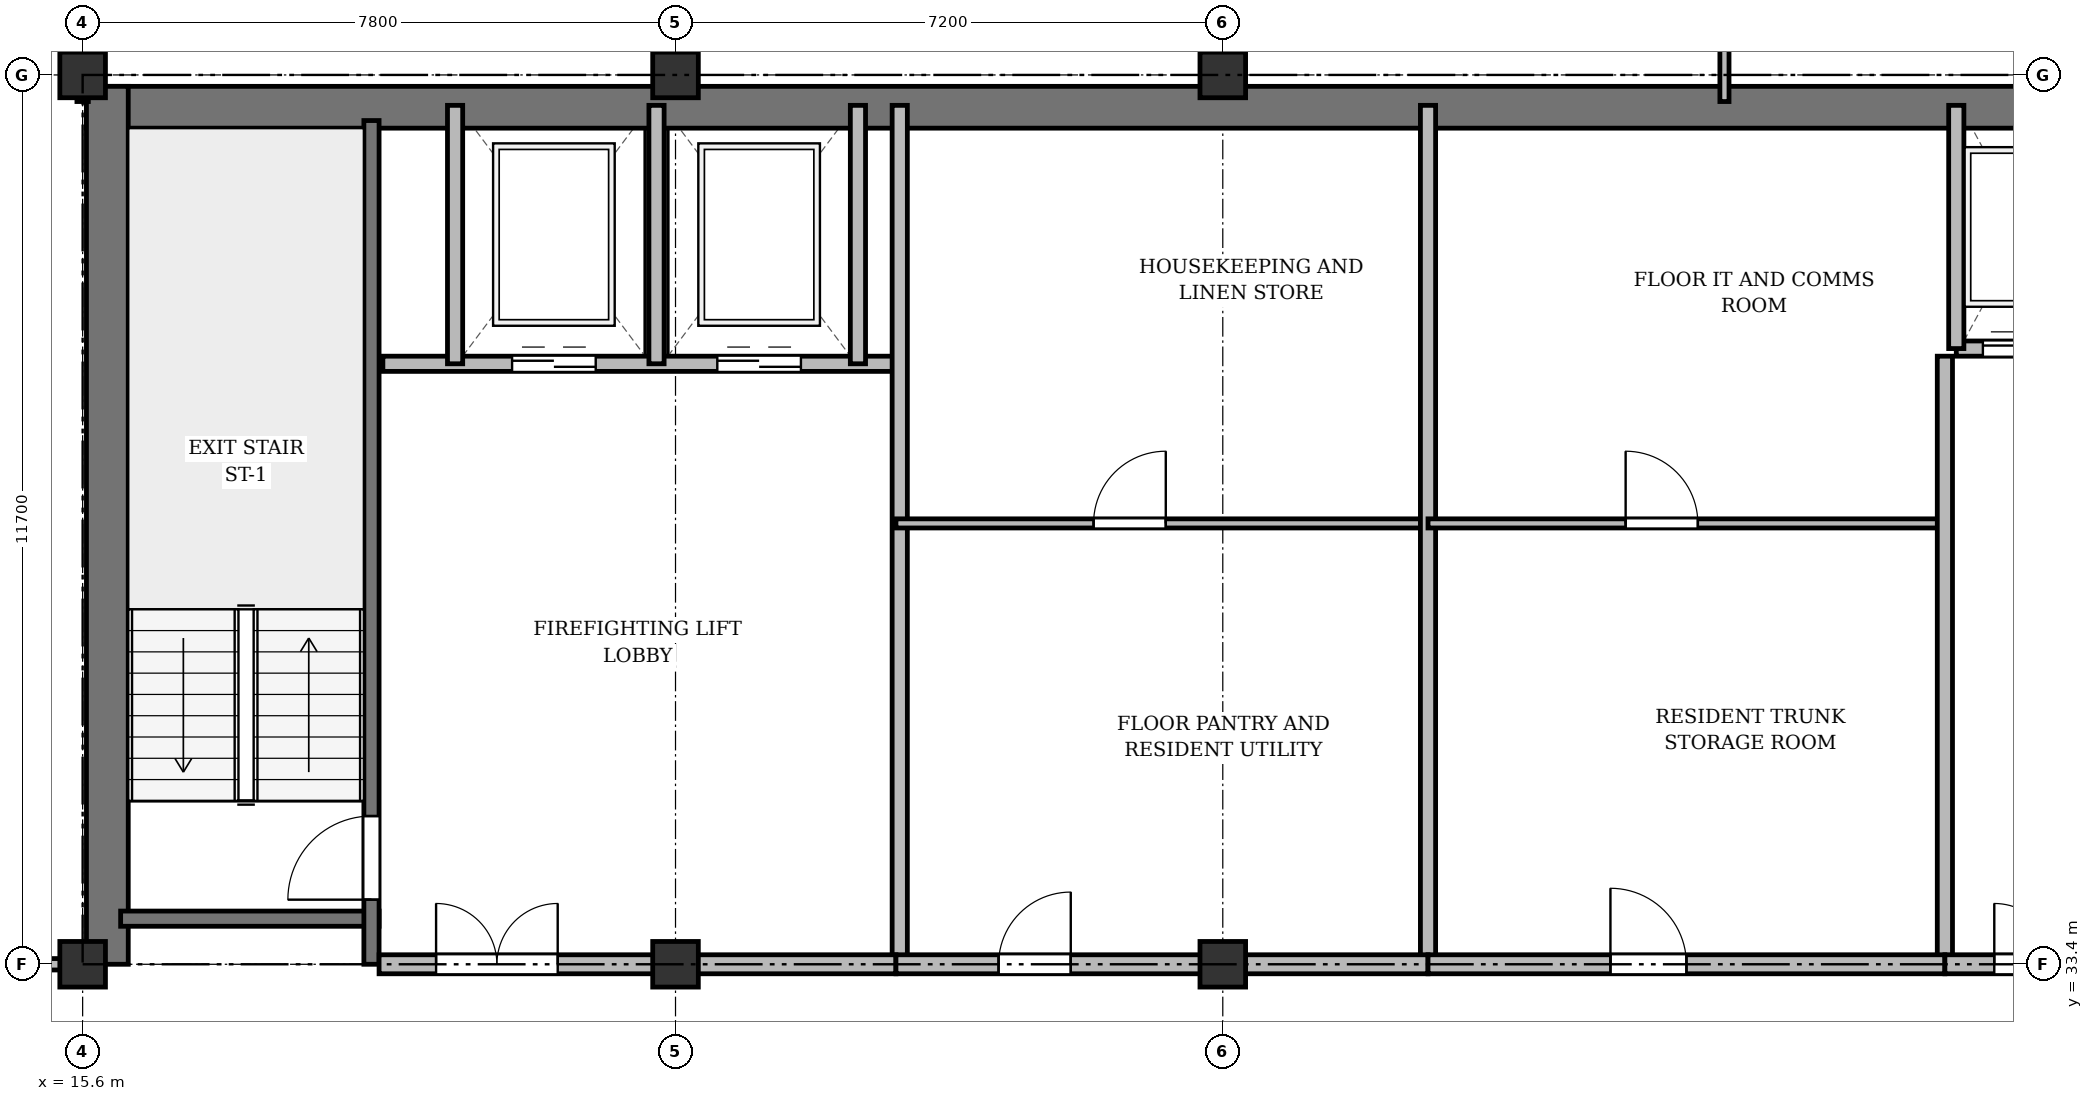
"""IFC4 building model, lengths in metres.
Left out: names, types, materials, properties, quantities, classifications, styles, units other than length and angle.
Written with IfcOpenShell. Run it as: python <this file> out.ifc"""

import sys

from ifc_helpers import new_model, si_unit, direction, frame, frame_2d, origin, origin_2d, place, context, subcontext, project, spatial, rectangle, extrude, source, transform, mapped, element, fill, save


model = new_model("IFC4")
c1 = context("Model", 3, precision=1e-05, world=origin(), true_north=direction((0.0, 1.0)))
c2 = subcontext(c1, "Body", "Model", "MODEL_VIEW")
j1 = project(units=[si_unit("LENGTHUNIT", "METRE"), si_unit("PLANEANGLEUNIT", "RADIAN")], contexts=[c1])
p1 = place(None, origin())
s1 = spatial("IfcSite", under=j1, at=p1, CompositionType="ELEMENT")
p2 = place(p1, origin())
s2 = spatial("IfcBuilding", under=s1, at=p2, CompositionType="ELEMENT")
p3 = place(p2, frame((0.0, 0.0, 270.3)))
s3 = spatial("IfcBuildingStorey", under=s2, at=p3, CompositionType="ELEMENT", Elevation=270.3)
m1 = source(origin(), c2, "Body", "SweptSolid", [
    extrude(rectangle(XDim=0.6, YDim=0.6, at=origin_2d()), origin(), (0.0, 0.0, 1.0), 3.6),
])
for number, where, z_axis, x_axis in (
    (1, (15.6, 33.4, 0.0), (0.0, 0.0, 1.0), (1.0, 0.0, 0.0)),
    (2, (15.6, 45.1, 0.0), (0.0, 0.0, 1.0), (1.0, 0.0, 0.0)),
    (3, (23.4, 33.4, 0.0), (0.0, 0.0, 1.0), (1.0, 0.0, 0.0)),
    (4, (23.4, 45.1, 0.0), (0.0, 0.0, 1.0), (1.0, 0.0, 0.0)),
    (5, (30.6, 33.4, 0.0), (0.0, 0.0, 1.0), (1.0, 0.0, 0.0)),
    (6, (30.6, 45.1, 0.0), (0.0, 0.0, 1.0), (1.0, 0.0, 0.0)),
):
    element("IfcColumn", number, at=place(p3, frame(where, z_axis=z_axis, x_axis=x_axis)), inside=s3, PredefinedType="COLUMN", context=c2, shape_type="MappedRepresentation", body=[
        mapped(m1, transform((0.0, 0.0, 0.0), x_axis=(1.0, 0.0, 0.0), y_axis=(0.0, 1.0, 0.0), z_axis=(0.0, 0.0, 1.0), scale=1.0)),
    ])
p4 = place(p3, frame((15.65, 44.675, 0.0), z_axis=(0.0, 0.0, 1.0), x_axis=(1.0, 0.0, 0.0)))
e7 = element("IfcWall", 7, at=p4, inside=s3, PredefinedType="SHEAR", context=c2, shape_type="SweptSolid", body=[
    extrude(rectangle(XDim=43.1, YDim=0.55, at=frame_2d((21.55, 0.0))), origin(), (0.0, 0.0, 1.0), 3.37),
])
p5 = place(p3, frame((15.925, 33.4, 0.0), z_axis=(0.0, 0.0, 1.0), x_axis=(0.0, 1.0, 0.0)))
e8 = element("IfcWall", 8, at=p5, inside=s3, PredefinedType="SHEAR", context=c2, shape_type="SweptSolid", body=[
    extrude(rectangle(XDim=11.55, YDim=0.55, at=frame_2d((5.775, 0.0))), origin(), (0.0, 0.0, 1.0), 3.37),
])
p6 = place(p3, frame((16.1, 34.0, 0.0), z_axis=(0.0, 0.0, 1.0), x_axis=(1.0, 0.0, 0.0)))
e9 = element("IfcWall", 9, at=p6, inside=s3, PredefinedType="SHEAR", context=c2, shape_type="SweptSolid", body=[
    extrude(rectangle(XDim=3.4, YDim=0.2, at=frame_2d((1.7, 0.0))), origin(), (0.0, 0.0, 1.0), 3.37),
])
p7 = place(p3, frame((19.4, 33.4, 0.0), z_axis=(0.0, 0.0, 1.0), x_axis=(0.0, 1.0, 0.0)))
e10 = element("IfcWall", 10, at=p7, inside=s3, PredefinedType="SHEAR", context=c2, shape_type="SweptSolid", body=[
    extrude(rectangle(XDim=11.1, YDim=0.2, at=frame_2d((5.55, 0.0))), origin(), (0.0, 0.0, 1.0), 3.37),
])
p8 = place(p7, frame((0.85, 0.0, 0.0)))
e11 = element("IfcOpeningElement", 11, at=p8, cuts=e10, PredefinedType="OPENING", context=c2, shape_type="SweptSolid", body=[
    extrude(rectangle(XDim=1.1, YDim=2.15, at=frame_2d((0.55, 1.075))), frame((0.0, 0.11, 0.0), z_axis=(0.0, -1.0, 0.0), x_axis=(1.0, 0.0, 0.0)), (0.0, 0.0, 1.0), 0.22),
])
p9 = place(p3, frame((19.55, 41.3, 0.0), z_axis=(0.0, 0.0, 1.0), x_axis=(1.0, 0.0, 0.0)))
e12 = element("IfcWall", 12, at=p9, inside=s3, PredefinedType="SOLIDWALL", context=c2, shape_type="SweptSolid", body=[
    extrude(rectangle(XDim=6.75, YDim=0.2, at=frame_2d((3.375, 0.0))), origin(), (0.0, 0.0, 1.0), 3.37),
])
p10 = place(p9, frame((1.7, 0.0, 0.0)))
e13 = element("IfcOpeningElement", 13, at=p10, cuts=e12, PredefinedType="OPENING", context=c2, shape_type="SweptSolid", body=[
    extrude(rectangle(XDim=1.1, YDim=2.15, at=frame_2d((0.55, 1.075))), frame((0.0, 0.11, 0.0), z_axis=(0.0, -1.0, 0.0), x_axis=(1.0, 0.0, 0.0)), (0.0, 0.0, 1.0), 0.22),
])
p11 = place(p9, frame((4.4, 0.0, 0.0)))
e14 = element("IfcOpeningElement", 14, at=p11, cuts=e12, PredefinedType="OPENING", context=c2, shape_type="SweptSolid", body=[
    extrude(rectangle(XDim=1.1, YDim=2.15, at=frame_2d((0.55, 1.075))), frame((0.0, 0.11, 0.0), z_axis=(0.0, -1.0, 0.0), x_axis=(1.0, 0.0, 0.0)), (0.0, 0.0, 1.0), 0.22),
])
for number, where, z_axis, x_axis in (
    (15, (20.5, 41.3, 0.0), (0.0, 0.0, 1.0), (0.0, 1.0, 0.0)),
    (16, (23.15, 41.3, 0.0), (0.0, 0.0, 1.0), (0.0, 1.0, 0.0)),
    (17, (25.8, 41.3, 0.0), (0.0, 0.0, 1.0), (0.0, 1.0, 0.0)),
):
    element("IfcWall", number, at=place(p3, frame(where, z_axis=z_axis, x_axis=x_axis)), inside=s3, PredefinedType="SOLIDWALL", context=c2, shape_type="SweptSolid", body=[
        extrude(rectangle(XDim=3.4, YDim=0.2, at=frame_2d((1.7, 0.0))), origin(), (0.0, 0.0, 1.0), 3.37),
    ])
p12 = place(p3, frame((26.35, 33.4, 0.0), z_axis=(0.0, 0.0, 1.0), x_axis=(0.0, 1.0, 0.0)))
e18 = element("IfcWall", 18, at=p12, inside=s3, PredefinedType="SOLIDWALL", context=c2, shape_type="SweptSolid", body=[
    extrude(rectangle(XDim=11.3, YDim=0.2, at=frame_2d((5.65, 0.0))), origin(), (0.0, 0.0, 1.0), 2.92),
])
p13 = place(p3, frame((19.5, 33.4, 0.0), z_axis=(0.0, 0.0, 1.0), x_axis=(1.0, 0.0, 0.0)))
e19 = element("IfcWall", 19, at=p13, inside=s3, PredefinedType="PARTITIONING", context=c2, shape_type="SweptSolid", body=[
    extrude(rectangle(XDim=6.8, YDim=0.25, at=frame_2d((3.4, 0.0))), origin(), (0.0, 0.0, 1.0), 2.92),
])
p14 = place(p13, frame((0.75, 0.0, 0.0)))
e20 = element("IfcOpeningElement", 20, at=p14, cuts=e19, PredefinedType="OPENING", context=c2, shape_type="SweptSolid", body=[
    extrude(rectangle(XDim=1.6, YDim=2.2, at=frame_2d((0.8, 1.1))), frame((0.0, 0.135, 0.0), z_axis=(0.0, -1.0, 0.0), x_axis=(1.0, 0.0, 0.0)), (0.0, 0.0, 1.0), 0.27),
])
p15 = place(p3, frame((26.3, 39.2, 0.0), z_axis=(0.0, 0.0, 1.0), x_axis=(1.0, 0.0, 0.0)))
e21 = element("IfcWall", 21, at=p15, inside=s3, PredefinedType="PARTITIONING", context=c2, shape_type="SweptSolid", body=[
    extrude(rectangle(XDim=7.0, YDim=0.12, at=frame_2d((3.5, 0.0))), origin(), (0.0, 0.0, 1.0), 2.87),
])
p16 = place(p15, frame((2.6, 0.0, 0.0)))
e22 = element("IfcOpeningElement", 22, at=p16, cuts=e21, PredefinedType="OPENING", context=c2, shape_type="SweptSolid", body=[
    extrude(rectangle(XDim=0.95, YDim=2.15, at=frame_2d((0.475, 1.075))), frame((0.0, 0.07, 0.0), z_axis=(0.0, -1.0, 0.0), x_axis=(1.0, 0.0, 0.0)), (0.0, 0.0, 1.0), 0.14),
])
p17 = place(p3, frame((33.3, 33.4, 0.0), z_axis=(0.0, 0.0, 1.0), x_axis=(0.0, 1.0, 0.0)))
e23 = element("IfcWall", 23, at=p17, inside=s3, PredefinedType="SOLIDWALL", context=c2, shape_type="SweptSolid", body=[
    extrude(rectangle(XDim=11.3, YDim=0.2, at=frame_2d((5.65, 0.0))), origin(), (0.0, 0.0, 1.0), 2.92),
])
p18 = place(p3, frame((33.3, 39.2, 0.0), z_axis=(0.0, 0.0, 1.0), x_axis=(1.0, 0.0, 0.0)))
e24 = element("IfcWall", 24, at=p18, inside=s3, PredefinedType="PARTITIONING", context=c2, shape_type="SweptSolid", body=[
    extrude(rectangle(XDim=6.8, YDim=0.12, at=frame_2d((3.4, 0.0))), origin(), (0.0, 0.0, 1.0), 3.37),
])
p19 = place(p18, frame((2.6, 0.0, 0.0)))
e25 = element("IfcOpeningElement", 25, at=p19, cuts=e24, PredefinedType="OPENING", context=c2, shape_type="SweptSolid", body=[
    extrude(rectangle(XDim=0.95, YDim=2.15, at=frame_2d((0.475, 1.075))), frame((0.0, 0.07, 0.0), z_axis=(0.0, -1.0, 0.0), x_axis=(1.0, 0.0, 0.0)), (0.0, 0.0, 1.0), 0.14),
])
p20 = place(p3, frame((40.1, 33.4, 0.0), z_axis=(0.0, 0.0, 1.0), x_axis=(0.0, 1.0, 0.0)))
e26 = element("IfcWall", 26, at=p20, inside=s3, PredefinedType="SOLIDWALL", context=c2, shape_type="SweptSolid", body=[
    extrude(rectangle(XDim=8.0, YDim=0.2, at=frame_2d((4.0, 0.0))), origin(), (0.0, 0.0, 1.0), 2.92),
])
p21 = place(p3, frame((40.25, 41.5, 0.0), z_axis=(0.0, 0.0, 1.0), x_axis=(1.0, 0.0, 0.0)))
e27 = element("IfcWall", 27, at=p21, inside=s3, PredefinedType="SOLIDWALL", context=c2, shape_type="SweptSolid", body=[
    extrude(rectangle(XDim=6.9, YDim=0.2, at=frame_2d((3.45, 0.0))), origin(), (0.0, 0.0, 1.0), 3.37),
])
p22 = place(p21, frame((0.35, 0.0, 0.0)))
e28 = element("IfcOpeningElement", 28, at=p22, cuts=e27, PredefinedType="OPENING", context=c2, shape_type="SweptSolid", body=[
    extrude(rectangle(XDim=1.05, YDim=2.15, at=frame_2d((0.525, 1.075))), frame((0.0, 0.11, 0.0), z_axis=(0.0, -1.0, 0.0), x_axis=(1.0, 0.0, 0.0)), (0.0, 0.0, 1.0), 0.22),
])
p23 = place(p21, frame((2.05, 0.0, 0.0)))
e29 = element("IfcOpeningElement", 29, at=p23, cuts=e27, PredefinedType="OPENING", context=c2, shape_type="SweptSolid", body=[
    extrude(rectangle(XDim=1.05, YDim=2.15, at=frame_2d((0.525, 1.075))), frame((0.0, 0.11, 0.0), z_axis=(0.0, -1.0, 0.0), x_axis=(1.0, 0.0, 0.0)), (0.0, 0.0, 1.0), 0.22),
])
p24 = place(p21, frame((3.75, 0.0, 0.0)))
e30 = element("IfcOpeningElement", 30, at=p24, cuts=e27, PredefinedType="OPENING", context=c2, shape_type="SweptSolid", body=[
    extrude(rectangle(XDim=1.05, YDim=2.15, at=frame_2d((0.525, 1.075))), frame((0.0, 0.11, 0.0), z_axis=(0.0, -1.0, 0.0), x_axis=(1.0, 0.0, 0.0)), (0.0, 0.0, 1.0), 0.22),
])
p25 = place(p21, frame((5.45, 0.0, 0.0)))
e31 = element("IfcOpeningElement", 31, at=p25, cuts=e27, PredefinedType="OPENING", context=c2, shape_type="SweptSolid", body=[
    extrude(rectangle(XDim=1.05, YDim=2.15, at=frame_2d((0.525, 1.075))), frame((0.0, 0.11, 0.0), z_axis=(0.0, -1.0, 0.0), x_axis=(1.0, 0.0, 0.0)), (0.0, 0.0, 1.0), 0.22),
])
p26 = place(p3, frame((40.25, 41.5, 0.0), z_axis=(0.0, 0.0, 1.0), x_axis=(0.0, 1.0, 0.0)))
e32 = element("IfcWall", 32, at=p26, inside=s3, PredefinedType="SOLIDWALL", context=c2, shape_type="SweptSolid", body=[
    extrude(rectangle(XDim=3.2, YDim=0.2, at=frame_2d((1.6, 0.0))), origin(), (0.0, 0.0, 1.0), 3.37),
])
p27 = place(p3, frame((26.3, 33.4, 0.0), z_axis=(0.0, 0.0, 1.0), x_axis=(1.0, 0.0, 0.0)))
e33 = element("IfcWall", 33, at=p27, inside=s3, PredefinedType="PARTITIONING", context=c2, shape_type="SweptSolid", body=[
    extrude(rectangle(XDim=7.0, YDim=0.25, at=frame_2d((3.5, 0.0))), origin(), (0.0, 0.0, 1.0), 2.92),
])
p28 = place(p27, frame((1.35, 0.0, 0.0)))
e34 = element("IfcOpeningElement", 34, at=p28, cuts=e33, PredefinedType="OPENING", context=c2, shape_type="SweptSolid", body=[
    extrude(rectangle(XDim=0.95, YDim=2.15, at=frame_2d((0.475, 1.075))), frame((0.0, 0.135, 0.0), z_axis=(0.0, -1.0, 0.0), x_axis=(1.0, 0.0, 0.0)), (0.0, 0.0, 1.0), 0.27),
])
p29 = place(p3, frame((33.3, 33.4, 0.0), z_axis=(0.0, 0.0, 1.0), x_axis=(1.0, 0.0, 0.0)))
e35 = element("IfcWall", 35, at=p29, inside=s3, PredefinedType="PARTITIONING", context=c2, shape_type="SweptSolid", body=[
    extrude(rectangle(XDim=6.8, YDim=0.25, at=frame_2d((3.4, 0.0))), origin(), (0.0, 0.0, 1.0), 2.92),
])
p30 = place(p29, frame((2.4, 0.0, 0.0)))
e36 = element("IfcOpeningElement", 36, at=p30, cuts=e35, PredefinedType="OPENING", context=c2, shape_type="SweptSolid", body=[
    extrude(rectangle(XDim=1.0, YDim=2.15, at=frame_2d((0.5, 1.075))), frame((0.0, 0.135, 0.0), z_axis=(0.0, -1.0, 0.0), x_axis=(1.0, 0.0, 0.0)), (0.0, 0.0, 1.0), 0.27),
])
p31 = place(p3, frame((40.1, 33.4, 0.0), z_axis=(0.0, 0.0, 1.0), x_axis=(1.0, 0.0, 0.0)))
e37 = element("IfcWall", 37, at=p31, inside=s3, PredefinedType="PARTITIONING", context=c2, shape_type="SweptSolid", body=[
    extrude(rectangle(XDim=7.05, YDim=0.25, at=frame_2d((3.525, 0.0))), origin(), (0.0, 0.0, 1.0), 2.92),
])
p32 = place(p31, frame((0.65, 0.0, 0.0)))
e38 = element("IfcOpeningElement", 38, at=p32, cuts=e37, PredefinedType="OPENING", context=c2, shape_type="SweptSolid", body=[
    extrude(rectangle(XDim=1.6, YDim=2.2, at=frame_2d((0.8, 1.1))), frame((0.0, 0.135, 0.0), z_axis=(0.0, -1.0, 0.0), x_axis=(1.0, 0.0, 0.0)), (0.0, 0.0, 1.0), 0.27),
])
p33 = place(p3, frame((8.45, 33.4, 0.0), z_axis=(0.0, 0.0, 1.0), x_axis=(1.0, 0.0, 0.0)))
e39 = element("IfcWall", 39, at=p33, inside=s3, PredefinedType="PARTITIONING", context=c2, shape_type="SweptSolid", body=[
    extrude(rectangle(XDim=7.15, YDim=0.15, at=frame_2d((3.575, 0.0))), origin(), (0.0, 0.0, 1.0), 2.92),
])
p34 = place(p33, frame((3.0, 0.0, 0.0)))
e40 = element("IfcOpeningElement", 40, at=p34, cuts=e39, PredefinedType="OPENING", context=c2, shape_type="SweptSolid", body=[
    extrude(rectangle(XDim=0.95, YDim=2.15, at=frame_2d((0.475, 1.075))), frame((0.0, 0.085, 0.0), z_axis=(0.0, -1.0, 0.0), x_axis=(1.0, 0.0, 0.0)), (0.0, 0.0, 1.0), 0.17),
])
p35 = place(p3, frame((37.2, 44.75, 0.0), z_axis=(0.0, 0.0, 1.0), x_axis=(0.0, 1.0, 0.0)))
e41 = element("IfcWall", 41, at=p35, inside=s3, PredefinedType="PARTITIONING", context=c2, shape_type="SweptSolid", body=[
    extrude(rectangle(XDim=3.61, YDim=0.12, at=frame_2d((1.805, 0.0))), origin(), (0.0, 0.0, 1.0), 2.92),
])
p36 = place(p35, frame((1.1, 0.0, 0.0)))
e42 = element("IfcOpeningElement", 42, at=p36, cuts=e41, PredefinedType="OPENING", context=c2, shape_type="SweptSolid", body=[
    extrude(rectangle(XDim=0.95, YDim=2.15, at=frame_2d((0.475, 1.075))), frame((0.0, 0.07, 0.0), z_axis=(0.0, -1.0, 0.0), x_axis=(1.0, 0.0, 0.0)), (0.0, 0.0, 1.0), 0.14),
])
p37 = place(p3, frame((15.6, 44.75, 0.0), z_axis=(0.0, 0.0, 1.0), x_axis=(0.0, 1.0, 0.0)))
e43 = element("IfcWall", 43, at=p37, inside=s3, PredefinedType="PARTITIONING", context=c2, shape_type="SweptSolid", body=[
    extrude(rectangle(XDim=3.61, YDim=0.15, at=frame_2d((1.805, 0.0))), origin(), (0.0, 0.0, 1.0), 2.87),
])
p38 = place(p37, frame((1.1, 0.0, 0.0)))
e44 = element("IfcOpeningElement", 44, at=p38, cuts=e43, PredefinedType="OPENING", context=c2, shape_type="SweptSolid", body=[
    extrude(rectangle(XDim=0.95, YDim=2.15, at=frame_2d((0.475, 1.075))), frame((0.0, 0.085, 0.0), z_axis=(0.0, -1.0, 0.0), x_axis=(1.0, 0.0, 0.0)), (0.0, 0.0, 1.0), 0.17),
])
m2 = source(origin(), c2, "Body", "SweptSolid", [
    extrude(rectangle(XDim=1.1, YDim=2.15, at=frame_2d((0.55, 1.075))), frame((0.0, 0.025, 0.0), z_axis=(0.0, -1.0, 0.0), x_axis=(1.0, 0.0, 0.0)), (0.0, 0.0, 1.0), 0.05),
])
p39 = place(p8, origin())
e45 = element("IfcDoor", 45, at=p39, inside=s3, OperationType="SINGLE_SWING_LEFT", PredefinedType="DOOR", context=c2, shape_type="MappedRepresentation", body=[
    mapped(m2, transform((0.0, 0.0, 0.0), x_axis=(1.0, 0.0, 0.0), y_axis=(0.0, 1.0, 0.0), z_axis=(0.0, 0.0, 1.0), scale=1.0)),
])
fill(e11, e45)
p40 = place(p10, origin())
e46 = element("IfcDoor", 46, at=p40, inside=s3, OperationType="DOUBLE_DOOR_SLIDING", PredefinedType="DOOR", context=c2, shape_type="MappedRepresentation", body=[
    mapped(m2, transform((0.0, 0.0, 0.0), x_axis=(1.0, 0.0, 0.0), y_axis=(0.0, 1.0, 0.0), z_axis=(0.0, 0.0, 1.0), scale=1.0)),
])
fill(e13, e46)
p41 = place(p11, origin())
e47 = element("IfcDoor", 47, at=p41, inside=s3, OperationType="DOUBLE_DOOR_SLIDING", PredefinedType="DOOR", context=c2, shape_type="MappedRepresentation", body=[
    mapped(m2, transform((0.0, 0.0, 0.0), x_axis=(1.0, 0.0, 0.0), y_axis=(0.0, 1.0, 0.0), z_axis=(0.0, 0.0, 1.0), scale=1.0)),
])
fill(e14, e47)
m3 = source(origin(), c2, "Body", "SweptSolid", [
    extrude(rectangle(XDim=1.6, YDim=2.2, at=frame_2d((0.8, 1.1))), frame((0.0, 0.025, 0.0), z_axis=(0.0, -1.0, 0.0), x_axis=(1.0, 0.0, 0.0)), (0.0, 0.0, 1.0), 0.05),
])
p42 = place(p14, origin())
e48 = element("IfcDoor", 48, at=p42, inside=s3, OperationType="DOUBLE_DOOR_SINGLE_SWING", PredefinedType="DOOR", context=c2, shape_type="MappedRepresentation", body=[
    mapped(m3, transform((0.0, 0.0, 0.0), x_axis=(1.0, 0.0, 0.0), y_axis=(0.0, 1.0, 0.0), z_axis=(0.0, 0.0, 1.0), scale=1.0)),
])
fill(e20, e48)
m4 = source(origin(), c2, "Body", "SweptSolid", [
    extrude(rectangle(XDim=0.95, YDim=2.15, at=frame_2d((0.475, 1.075))), frame((0.0, 0.025, 0.0), z_axis=(0.0, -1.0, 0.0), x_axis=(1.0, 0.0, 0.0)), (0.0, 0.0, 1.0), 0.05),
])
p43 = place(p16, origin())
e49 = element("IfcDoor", 49, at=p43, inside=s3, OperationType="SINGLE_SWING_RIGHT", PredefinedType="DOOR", context=c2, shape_type="MappedRepresentation", body=[
    mapped(m4, transform((0.0, 0.0, 0.0), x_axis=(1.0, 0.0, 0.0), y_axis=(0.0, 1.0, 0.0), z_axis=(0.0, 0.0, 1.0), scale=1.0)),
])
fill(e22, e49)
p44 = place(p19, origin())
e50 = element("IfcDoor", 50, at=p44, inside=s3, OperationType="SINGLE_SWING_LEFT", PredefinedType="DOOR", context=c2, shape_type="MappedRepresentation", body=[
    mapped(m4, transform((0.0, 0.0, 0.0), x_axis=(1.0, 0.0, 0.0), y_axis=(0.0, 1.0, 0.0), z_axis=(0.0, 0.0, 1.0), scale=1.0)),
])
fill(e25, e50)
m5 = source(origin(), c2, "Body", "SweptSolid", [
    extrude(rectangle(XDim=1.05, YDim=2.15, at=frame_2d((0.525, 1.075))), frame((0.0, 0.025, 0.0), z_axis=(0.0, -1.0, 0.0), x_axis=(1.0, 0.0, 0.0)), (0.0, 0.0, 1.0), 0.05),
])
p45 = place(p22, origin())
e51 = element("IfcDoor", 51, at=p45, inside=s3, OperationType="DOUBLE_DOOR_SLIDING", PredefinedType="DOOR", context=c2, shape_type="MappedRepresentation", body=[
    mapped(m5, transform((0.0, 0.0, 0.0), x_axis=(1.0, 0.0, 0.0), y_axis=(0.0, 1.0, 0.0), z_axis=(0.0, 0.0, 1.0), scale=1.0)),
])
fill(e28, e51)
p46 = place(p28, origin())
e52 = element("IfcDoor", 52, at=p46, inside=s3, OperationType="SINGLE_SWING_RIGHT", PredefinedType="DOOR", context=c2, shape_type="MappedRepresentation", body=[
    mapped(m4, transform((0.0, 0.0, 0.0), x_axis=(1.0, 0.0, 0.0), y_axis=(0.0, 1.0, 0.0), z_axis=(0.0, 0.0, 1.0), scale=1.0)),
])
fill(e34, e52)
m6 = source(origin(), c2, "Body", "SweptSolid", [
    extrude(rectangle(XDim=1.0, YDim=2.15, at=frame_2d((0.5, 1.075))), frame((0.0, 0.025, 0.0), z_axis=(0.0, -1.0, 0.0), x_axis=(1.0, 0.0, 0.0)), (0.0, 0.0, 1.0), 0.05),
])
p47 = place(p30, origin())
e53 = element("IfcDoor", 53, at=p47, inside=s3, OperationType="SINGLE_SWING_LEFT", PredefinedType="DOOR", context=c2, shape_type="MappedRepresentation", body=[
    mapped(m6, transform((0.0, 0.0, 0.0), x_axis=(1.0, 0.0, 0.0), y_axis=(0.0, 1.0, 0.0), z_axis=(0.0, 0.0, 1.0), scale=1.0)),
])
fill(e36, e53)
p48 = place(p32, origin())
e54 = element("IfcDoor", 54, at=p48, inside=s3, OperationType="DOUBLE_DOOR_SINGLE_SWING", PredefinedType="DOOR", context=c2, shape_type="MappedRepresentation", body=[
    mapped(m3, transform((0.0, 0.0, 0.0), x_axis=(1.0, 0.0, 0.0), y_axis=(0.0, 1.0, 0.0), z_axis=(0.0, 0.0, 1.0), scale=1.0)),
])
fill(e38, e54)
save(model, sys.argv[1])
